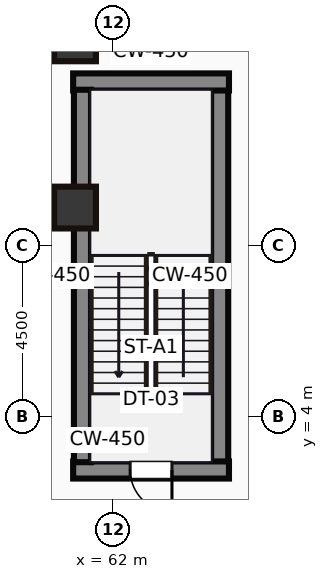
"""IFC4 building model, lengths in metres.
Left out: names, types, materials, properties, quantities, classifications, styles, units other than length and angle.
Written with IfcOpenShell. Run it as: python <this file> out.ifc"""

import sys

from ifc_helpers import new_model, si_unit, direction, frame, frame_2d, origin, origin_2d, place, context, subcontext, project, spatial, rectangle, hollow_rectangle, extrude, source, transform, mapped, element, fill, save


model = new_model("IFC4")
c1 = context("Model", 3, precision=1e-05, world=origin(), true_north=direction((0.0, 1.0)))
c2 = subcontext(c1, "Body", "Model", "MODEL_VIEW")
j1 = project(units=[si_unit("LENGTHUNIT", "METRE"), si_unit("PLANEANGLEUNIT", "RADIAN")], contexts=[c1])
p1 = place(None, origin())
s1 = spatial("IfcSite", under=j1, at=p1, CompositionType="ELEMENT")
p2 = place(p1, origin())
s2 = spatial("IfcBuilding", under=s1, at=p2, CompositionType="ELEMENT")
p3 = place(p2, frame((0.0, 0.0, 16.0)))
s3 = spatial("IfcBuildingStorey", under=s2, at=p3, CompositionType="ELEMENT", Elevation=16.0)
m1 = source(origin(), c2, "Body", "SweptSolid", [
    extrude(hollow_rectangle(XDim=1.1, YDim=1.3, WallThickness=0.055, at=origin_2d()), origin(), (0.0, 0.0, 1.0), 5.0),
])
p4 = place(p3, frame((61.0, 14.0, 0.0), z_axis=(0.0, 0.0, 1.0), x_axis=(1.0, 0.0, 0.0)))
e1 = element("IfcColumn", 1, at=p4, inside=s3, PredefinedType="PILASTER", context=c2, shape_type="MappedRepresentation", body=[
    mapped(m1, transform((0.0, 0.0, 0.0))),
])
m2 = source(origin(), c2, "Body", "SweptSolid", [
    extrude(hollow_rectangle(XDim=1.1, YDim=1.1, WallThickness=0.05, at=origin_2d()), origin(), (0.0, 0.0, 1.0), 5.0),
])
p5 = place(p3, frame((61.0, 9.5, 0.0), z_axis=(0.0, 0.0, 1.0), x_axis=(1.0, 0.0, 0.0)))
e2 = element("IfcColumn", 2, at=p5, inside=s3, PredefinedType="PILASTER", context=c2, shape_type="MappedRepresentation", body=[
    mapped(m2, transform((0.0, 0.0, 0.0))),
])
m3 = source(origin(), c2, "Body", "SweptSolid", [
    extrude(rectangle(XDim=4.1, YDim=0.45, at=frame_2d((2.05, 0.0))), origin(), (0.0, 0.0, 1.0), 5.0),
])
p6 = place(p3, frame((60.95, 2.595, 0.0), z_axis=(0.0, 0.0, 1.0), x_axis=(1.0, 0.0, 0.0)))
e3 = element("IfcWall", 3, at=p6, inside=s3, PredefinedType="SHEAR", context=c2, shape_type="MappedRepresentation", body=[
    mapped(m3, transform((0.0, 0.0, 0.0))),
])
p7 = place(p6, frame((1.5, 0.0, 0.0)))
e4 = element("IfcOpeningElement", 4, at=p7, cuts=e3, PredefinedType="OPENING", context=c2, shape_type="SweptSolid", body=[
    extrude(rectangle(XDim=1.1, YDim=2.15, at=frame_2d((0.55, 1.075))), frame((0.0, 0.235, 0.0), z_axis=(0.0, -1.0, 0.0), x_axis=(1.0, 0.0, 0.0)), (0.0, 0.0, 1.0), 0.47),
])
m4 = source(origin(), c2, "Body", "SweptSolid", [
    extrude(rectangle(XDim=9.8, YDim=0.45, at=frame_2d((4.9, 0.0))), origin(), (0.0, 0.0, 1.0), 5.0),
])
for number, where, z_axis, x_axis in (
    (5, (61.195, 2.8, 0.0), (0.0, 0.0, 1.0), (0.0, 1.0, 0.0)),
    (6, (64.805, 2.8, 0.0), (0.0, 0.0, 1.0), (0.0, 1.0, 0.0)),
):
    element("IfcWall", number, at=place(p3, frame(where, z_axis=z_axis, x_axis=x_axis)), inside=s3, PredefinedType="SHEAR", context=c2, shape_type="MappedRepresentation", body=[
        mapped(m4, transform((0.0, 0.0, 0.0))),
    ])
p8 = place(p3, frame((60.95, 12.805, 0.0), z_axis=(0.0, 0.0, 1.0), x_axis=(1.0, 0.0, 0.0)))
e7 = element("IfcWall", 7, at=p8, inside=s3, PredefinedType="SHEAR", context=c2, shape_type="MappedRepresentation", body=[
    mapped(m3, transform((0.0, 0.0, 0.0))),
])
m5 = source(origin(), c2, "Body", "SweptSolid", [
    extrude(rectangle(XDim=1.1, YDim=2.15, at=frame_2d((0.55, 1.075))), frame((0.0, 0.025, 0.0), z_axis=(0.0, -1.0, 0.0), x_axis=(1.0, 0.0, 0.0)), (0.0, 0.0, 1.0), 0.05),
])
p9 = place(p7, origin())
e8 = element("IfcDoor", 8, at=p9, inside=s3, OperationType="SINGLE_SWING_RIGHT", PredefinedType="DOOR", context=c2, shape_type="MappedRepresentation", body=[
    mapped(m5, transform((0.0, 0.0, 0.0))),
])
fill(e4, e8)
save(model, sys.argv[1])
